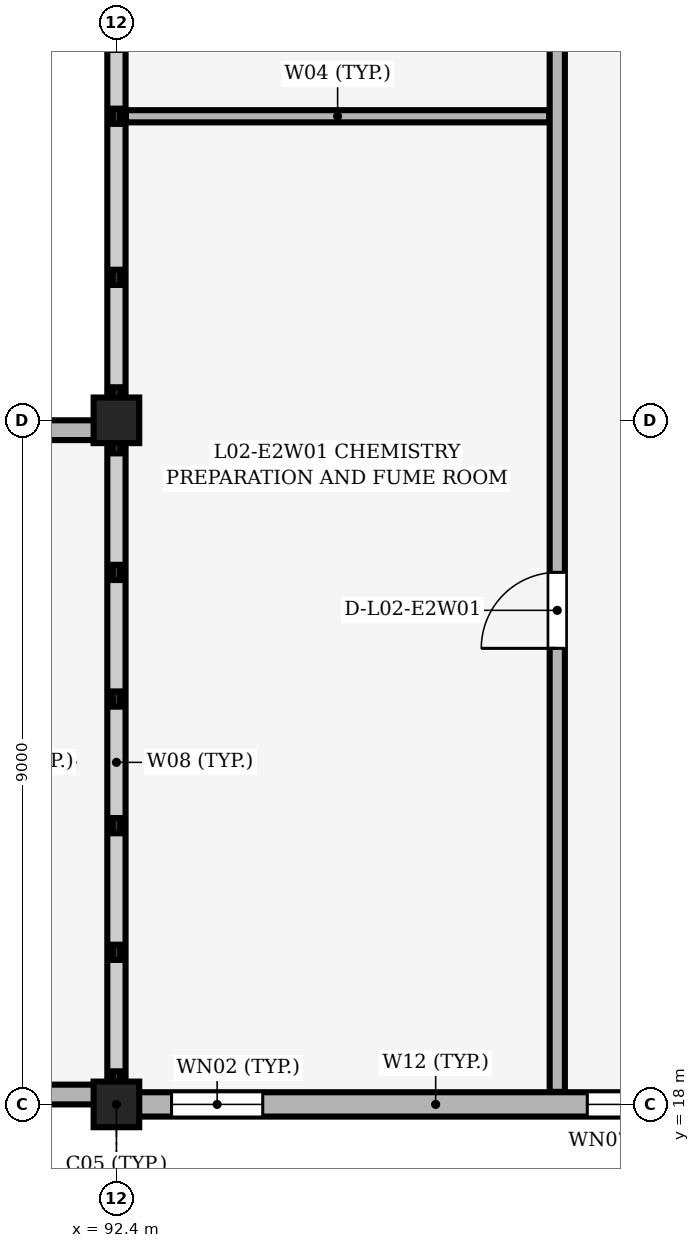
"""IFC4 building model, lengths in metres.
Left out: names, types, materials, properties, quantities, classifications, styles, units other than length and angle.
Written with IfcOpenShell. Run it as: python <this file> out.ifc"""

import sys

from ifc_helpers import new_model, si_unit, direction, frame, frame_2d, origin, origin_2d, place, context, subcontext, project, spatial, rectangle, extrude, element, fill, save


model = new_model("IFC4")
c1 = context("Model", 3, precision=1e-05, world=origin(), true_north=direction((0.0, 1.0)))
c2 = subcontext(c1, "Body", "Model", "MODEL_VIEW")
j1 = project(units=[si_unit("LENGTHUNIT", "METRE"), si_unit("PLANEANGLEUNIT", "RADIAN")], contexts=[c1])
p1 = place(None, origin())
s1 = spatial("IfcSite", under=j1, at=p1, CompositionType="ELEMENT")
p2 = place(p1, origin())
s2 = spatial("IfcBuilding", under=s1, at=p2, CompositionType="ELEMENT")
p3 = place(p2, frame((0.0, 0.0, 9.0)))
s3 = spatial("IfcBuildingStorey", under=s2, at=p3, CompositionType="ELEMENT", Elevation=9.0)
for number, where, z_axis, x_axis in (
    (1, (92.4, 18.0, 0.0), (0.0, 0.0, 1.0), (1.0, 0.0, 0.0)),
    (2, (92.4, 27.0, 0.0), (0.0, 0.0, 1.0), (1.0, 0.0, 0.0)),
):
    element("IfcColumn", number, at=place(p3, frame(where, z_axis=z_axis, x_axis=x_axis)), inside=s3, PredefinedType="COLUMN", context=c2, shape_type="SweptSolid", body=[
        extrude(rectangle(XDim=0.6, YDim=0.6, at=origin_2d()), origin(), (0.0, 0.0, 1.0), 4.2),
    ])
p4 = place(p3, frame((92.4, 18.275, 0.0), z_axis=(0.0, 0.0, 1.0), x_axis=(0.0, 1.0, 0.0)))
e3 = element("IfcWall", 3, at=p4, inside=s3, PredefinedType="SOLIDWALL", context=c2, shape_type="SweptSolid", body=[
    extrude(rectangle(XDim=8.45, YDim=0.24, at=frame_2d((4.225, 0.0))), origin(), (0.0, 0.0, 1.0), 1.15),
])
p5 = place(p3, frame((92.4, 27.275, 0.0), z_axis=(0.0, 0.0, 1.0), x_axis=(0.0, 1.0, 0.0)))
e4 = element("IfcWall", 4, at=p5, inside=s3, PredefinedType="SOLIDWALL", context=c2, shape_type="SweptSolid", body=[
    extrude(rectangle(XDim=7.85, YDim=0.24, at=frame_2d((3.925, 0.0))), origin(), (0.0, 0.0, 1.0), 1.15),
])
p6 = place(p3, frame((92.675, 18.0, 0.0), z_axis=(0.0, 0.0, 1.0), x_axis=(1.0, 0.0, 0.0)))
e5 = element("IfcWall", 5, at=p6, inside=s3, PredefinedType="SOLIDWALL", context=c2, shape_type="SweptSolid", body=[
    extrude(rectangle(XDim=7.85, YDim=0.32, at=frame_2d((3.925, 0.0))), origin(), (0.0, 0.0, 1.0), 3.18),
])
p7 = place(p6, frame((0.45, 0.0, 0.9)))
e6 = element("IfcOpeningElement", 6, at=p7, cuts=e5, PredefinedType="OPENING", context=c2, shape_type="SweptSolid", body=[
    extrude(rectangle(XDim=1.2, YDim=1.8, at=frame_2d((0.6, 0.9))), frame((0.0, 0.17, 0.0), z_axis=(0.0, -1.0, 0.0), x_axis=(1.0, 0.0, 0.0)), (0.0, 0.0, 1.0), 0.34),
])
p8 = place(p6, frame((5.92, 0.0, 0.9)))
e7 = element("IfcOpeningElement", 7, at=p8, cuts=e5, PredefinedType="OPENING", context=c2, shape_type="SweptSolid", body=[
    extrude(rectangle(XDim=1.68, YDim=2.13, at=frame_2d((0.84, 1.065))), frame((0.0, 0.17, 0.0), z_axis=(0.0, -1.0, 0.0), x_axis=(1.0, 0.0, 0.0)), (0.0, 0.0, 1.0), 0.34),
])
for number, where, z_axis, x_axis in (
    (8, (67.33, 18.13, 0.0), (0.0, 0.0, 1.0), (1.0, 0.0, 0.0)),
    (9, (67.33, 26.87, 0.0), (0.0, 0.0, 1.0), (1.0, 0.0, 0.0)),
):
    element("IfcWall", number, at=place(p3, frame(where, z_axis=z_axis, x_axis=x_axis)), inside=s3, PredefinedType="PARAPET", context=c2, shape_type="SweptSolid", body=[
        extrude(rectangle(XDim=24.94, YDim=0.26, at=frame_2d((12.47, 0.0))), origin(), (0.0, 0.0, 1.0), 0.85),
    ])
p9 = place(p3, frame((92.525, 31.0, 0.0), z_axis=(0.0, 0.0, 1.0), x_axis=(1.0, 0.0, 0.0)))
e10 = element("IfcWall", 10, at=p9, inside=s3, PredefinedType="PARTITIONING", context=c2, shape_type="SweptSolid", body=[
    extrude(rectangle(XDim=5.57, YDim=0.16, at=frame_2d((2.785, 0.0))), origin(), (0.0, 0.0, 1.0), 3.9),
])
p10 = place(p3, frame((98.2, 18.165, 0.0), z_axis=(0.0, 0.0, 1.0), x_axis=(0.0, 1.0, 0.0)))
e11 = element("IfcWall", 11, at=p10, inside=s3, PredefinedType="PARTITIONING", context=c2, shape_type="SweptSolid", body=[
    extrude(rectangle(XDim=67.625, YDim=0.2, at=frame_2d((33.812, 0.0))), origin(), (0.0, 0.0, 1.0), 3.9),
])
p11 = place(p10, frame((5.835, 0.0, 0.0)))
e12 = element("IfcOpeningElement", 12, at=p11, cuts=e11, PredefinedType="OPENING", context=c2, shape_type="SweptSolid", body=[
    extrude(rectangle(XDim=1.0, YDim=2.15, at=frame_2d((0.5, 1.075))), frame((0.0, 0.11, 0.0), z_axis=(0.0, -1.0, 0.0), x_axis=(1.0, 0.0, 0.0)), (0.0, 0.0, 1.0), 0.22),
])
p12 = place(p10, frame((18.735, 0.0, 0.0)))
e13 = element("IfcOpeningElement", 13, at=p12, cuts=e11, PredefinedType="OPENING", context=c2, shape_type="SweptSolid", body=[
    extrude(rectangle(XDim=1.0, YDim=2.15, at=frame_2d((0.5, 1.075))), frame((0.0, 0.11, 0.0), z_axis=(0.0, -1.0, 0.0), x_axis=(1.0, 0.0, 0.0)), (0.0, 0.0, 1.0), 0.22),
])
p13 = place(p10, frame((29.335, 0.0, 0.0)))
e14 = element("IfcOpeningElement", 14, at=p13, cuts=e11, PredefinedType="OPENING", context=c2, shape_type="SweptSolid", body=[
    extrude(rectangle(XDim=1.0, YDim=2.15, at=frame_2d((0.5, 1.075))), frame((0.0, 0.11, 0.0), z_axis=(0.0, -1.0, 0.0), x_axis=(1.0, 0.0, 0.0)), (0.0, 0.0, 1.0), 0.22),
])
p14 = place(p10, frame((36.36, 0.0, 0.0)))
e15 = element("IfcOpeningElement", 15, at=p14, cuts=e11, PredefinedType="OPENING", context=c2, shape_type="SweptSolid", body=[
    extrude(rectangle(XDim=0.95, YDim=2.2, at=frame_2d((0.475, 1.1))), frame((0.0, 0.11, 0.0), z_axis=(0.0, -1.0, 0.0), x_axis=(1.0, 0.0, 0.0)), (0.0, 0.0, 1.0), 0.22),
])
p15 = place(p10, frame((41.96, 0.0, 0.0)))
e16 = element("IfcOpeningElement", 16, at=p15, cuts=e11, PredefinedType="OPENING", context=c2, shape_type="SweptSolid", body=[
    extrude(rectangle(XDim=0.95, YDim=2.2, at=frame_2d((0.475, 1.1))), frame((0.0, 0.11, 0.0), z_axis=(0.0, -1.0, 0.0), x_axis=(1.0, 0.0, 0.0)), (0.0, 0.0, 1.0), 0.22),
])
p16 = place(p10, frame((47.56, 0.0, 0.0)))
e17 = element("IfcOpeningElement", 17, at=p16, cuts=e11, PredefinedType="OPENING", context=c2, shape_type="SweptSolid", body=[
    extrude(rectangle(XDim=0.95, YDim=2.1, at=frame_2d((0.475, 1.05))), frame((0.0, 0.11, 0.0), z_axis=(0.0, -1.0, 0.0), x_axis=(1.0, 0.0, 0.0)), (0.0, 0.0, 1.0), 0.22),
])
p17 = place(p10, frame((54.535, 0.0, 0.0)))
e18 = element("IfcOpeningElement", 18, at=p17, cuts=e11, PredefinedType="OPENING", context=c2, shape_type="SweptSolid", body=[
    extrude(rectangle(XDim=1.0, YDim=2.15, at=frame_2d((0.5, 1.075))), frame((0.0, 0.11, 0.0), z_axis=(0.0, -1.0, 0.0), x_axis=(1.0, 0.0, 0.0)), (0.0, 0.0, 1.0), 0.22),
])
p18 = place(p10, frame((62.935, 0.0, 0.0)))
e19 = element("IfcOpeningElement", 19, at=p18, cuts=e11, PredefinedType="OPENING", context=c2, shape_type="SweptSolid", body=[
    extrude(rectangle(XDim=1.0, YDim=2.15, at=frame_2d((0.5, 1.075))), frame((0.0, 0.11, 0.0), z_axis=(0.0, -1.0, 0.0), x_axis=(1.0, 0.0, 0.0)), (0.0, 0.0, 1.0), 0.22),
])
p19 = place(p7, origin())
e20 = element("IfcWindow", 20, at=p19, inside=s3, PartitioningType="SINGLE_PANEL", PredefinedType="WINDOW", context=c2, shape_type="SweptSolid", body=[
    extrude(rectangle(XDim=1.2, YDim=1.8, at=frame_2d((0.6, 0.9))), frame((0.0, 0.03, 0.0), z_axis=(0.0, -1.0, 0.0), x_axis=(1.0, 0.0, 0.0)), (0.0, 0.0, 1.0), 0.06),
])
fill(e6, e20)
p20 = place(p8, origin())
e21 = element("IfcWindow", 21, at=p20, inside=s3, PartitioningType="SINGLE_PANEL", PredefinedType="WINDOW", context=c2, shape_type="SweptSolid", body=[
    extrude(rectangle(XDim=1.68, YDim=2.13, at=frame_2d((0.84, 1.065))), frame((0.0, 0.03, 0.0), z_axis=(0.0, -1.0, 0.0), x_axis=(1.0, 0.0, 0.0)), (0.0, 0.0, 1.0), 0.06),
])
fill(e7, e21)
p21 = place(p11, origin())
e22 = element("IfcDoor", 22, at=p21, inside=s3, OperationType="SINGLE_SWING_LEFT", PredefinedType="DOOR", context=c2, shape_type="SweptSolid", body=[
    extrude(rectangle(XDim=1.0, YDim=2.15, at=frame_2d((0.5, 1.075))), frame((0.0, 0.025, 0.0), z_axis=(0.0, -1.0, 0.0), x_axis=(1.0, 0.0, 0.0)), (0.0, 0.0, 1.0), 0.05),
])
fill(e12, e22)
save(model, sys.argv[1])
